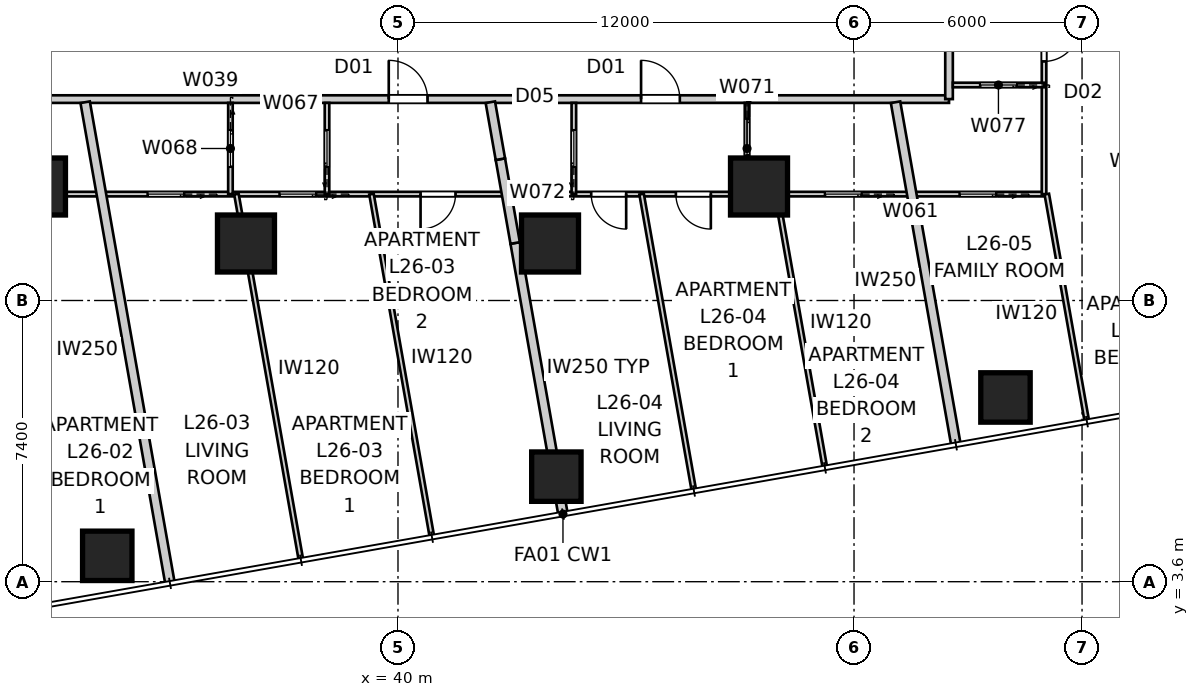
"""IFC4 building model, lengths in metres.
Left out: names, types, materials, properties, quantities, classifications, styles, units other than length and angle.
Written with IfcOpenShell. Run it as: python <this file> out.ifc"""

import sys

from ifc_helpers import new_model, si_unit, direction, frame, frame_2d, origin, origin_2d, place, context, subcontext, project, spatial, rectangle, extrude, element, fill, save


model = new_model("IFC4")
c1 = context("Model", 3, precision=1e-05, world=origin(), true_north=direction((0.0, 1.0)))
c2 = subcontext(c1, "Body", "Model", "MODEL_VIEW")
j1 = project(units=[si_unit("LENGTHUNIT", "METRE"), si_unit("PLANEANGLEUNIT", "RADIAN")], contexts=[c1])
p1 = place(None, origin())
s1 = spatial("IfcSite", under=j1, at=p1, CompositionType="ELEMENT")
p2 = place(p1, origin())
s2 = spatial("IfcBuilding", under=s1, at=p2, CompositionType="ELEMENT")
p3 = place(p2, frame((0.0, 0.0, 96.4)))
s3 = spatial("IfcBuildingStorey", under=s2, at=p3, CompositionType="ELEMENT", Elevation=96.4)
for number, where, z_axis, x_axis in (
    (1, (32.35, 4.281, 0.0), (0.0, 0.0, 1.0), (1.0, 0.0, 0.0)),
    (2, (44.167, 6.365, 0.0), (0.0, 0.0, 1.0), (1.0, 0.0, 0.0)),
    (3, (55.985, 8.448, 0.0), (0.0, 0.0, 1.0), (1.0, 0.0, 0.0)),
):
    element("IfcColumn", number, at=place(p3, frame(where, z_axis=z_axis, x_axis=x_axis)), inside=s3, PredefinedType="COLUMN", context=c2, shape_type="SweptSolid", body=[
        extrude(rectangle(XDim=1.3, YDim=1.3, at=origin_2d()), origin(), (0.0, 0.0, 1.0), 3.4),
    ])
for number, where, z_axis, x_axis in (
    (4, (30.5, 14.0, 0.0), (0.0, 0.0, 1.0), (1.0, 0.0, 0.0)),
    (5, (36.0, 12.5, 0.0), (0.0, 0.0, 1.0), (1.0, 0.0, 0.0)),
    (6, (44.0, 12.5, 0.0), (0.0, 0.0, 1.0), (1.0, 0.0, 0.0)),
    (7, (49.5, 14.0, 0.0), (0.0, 0.0, 1.0), (1.0, 0.0, 0.0)),
):
    element("IfcColumn", number, at=place(p3, frame(where, z_axis=z_axis, x_axis=x_axis)), inside=s3, PredefinedType="COLUMN", context=c2, shape_type="SweptSolid", body=[
        extrude(rectangle(XDim=1.5, YDim=1.5, at=origin_2d()), origin(), (0.0, 0.0, 1.0), 3.4),
    ])
p4 = place(p3, frame((25.5, 16.3, 0.0), z_axis=(0.0, 0.0, 1.0), x_axis=(1.0, 0.0, 0.0)))
e8 = element("IfcWall", 8, at=p4, inside=s3, PredefinedType="PARTITIONING", context=c2, shape_type="SweptSolid", body=[
    extrude(rectangle(XDim=29.0, YDim=0.2, at=frame_2d((14.5, 0.0))), origin(), (0.0, 0.0, 1.0), 3.25),
])
p5 = place(p4, frame((20.896, 0.0, 0.0)))
e9 = element("IfcOpeningElement", 9, at=p5, cuts=e8, PredefinedType="OPENING", context=c2, shape_type="SweptSolid", body=[
    extrude(rectangle(XDim=1.02, YDim=2.34, at=frame_2d((0.51, 1.17))), frame((0.0, 0.11, 0.0), z_axis=(0.0, -1.0, 0.0), x_axis=(1.0, 0.0, 0.0)), (0.0, 0.0, 1.0), 0.22),
])
p6 = place(p4, frame((14.257, 0.0, 0.0)))
e10 = element("IfcOpeningElement", 10, at=p6, cuts=e8, PredefinedType="OPENING", context=c2, shape_type="SweptSolid", body=[
    extrude(rectangle(XDim=1.02, YDim=2.34, at=frame_2d((0.51, 1.17))), frame((0.0, 0.11, 0.0), z_axis=(0.0, -1.0, 0.0), x_axis=(1.0, 0.0, 0.0)), (0.0, 0.0, 1.0), 0.22),
])
p7 = place(p4, frame((3.857, 0.0, 0.0)))
e11 = element("IfcOpeningElement", 11, at=p7, cuts=e8, PredefinedType="OPENING", context=c2, shape_type="SweptSolid", body=[
    extrude(rectangle(XDim=1.02, YDim=2.34, at=frame_2d((0.51, 1.17))), frame((0.0, 0.11, 0.0), z_axis=(0.0, -1.0, 0.0), x_axis=(1.0, 0.0, 0.0)), (0.0, 0.0, 1.0), 0.22),
])
p8 = place(p3, frame((54.5, 16.3, 0.0), z_axis=(0.0, 0.0, 1.0), x_axis=(0.0, 1.0, 0.0)))
e12 = element("IfcWall", 12, at=p8, inside=s3, PredefinedType="PARTITIONING", context=c2, shape_type="SweptSolid", body=[
    extrude(rectangle(XDim=27.4, YDim=0.2, at=frame_2d((13.7, 0.0))), origin(), (0.0, 0.0, 1.0), 3.25),
])
p9 = place(p8, frame((19.308, 0.0, 0.0)))
e13 = element("IfcOpeningElement", 13, at=p9, cuts=e12, PredefinedType="OPENING", context=c2, shape_type="SweptSolid", body=[
    extrude(rectangle(XDim=1.02, YDim=2.34, at=frame_2d((0.51, 1.17))), frame((0.0, 0.11, 0.0), z_axis=(0.0, -1.0, 0.0), x_axis=(1.0, 0.0, 0.0)), (0.0, 0.0, 1.0), 0.22),
])
p10 = place(p8, frame((24.687, 0.0, 0.0)))
e14 = element("IfcOpeningElement", 14, at=p10, cuts=e12, PredefinedType="OPENING", context=c2, shape_type="SweptSolid", body=[
    extrude(rectangle(XDim=1.02, YDim=2.1, at=frame_2d((0.51, 1.05))), frame((0.0, 0.11, 0.0), z_axis=(0.0, -1.0, 0.0), x_axis=(1.0, 0.0, 0.0)), (0.0, 0.0, 1.0), 0.22),
])
p11 = place(p8, frame((1.622, 0.0, 0.0)))
e15 = element("IfcOpeningElement", 15, at=p11, cuts=e12, PredefinedType="OPENING", context=c2, shape_type="SweptSolid", body=[
    extrude(rectangle(XDim=1.02, YDim=2.1, at=frame_2d((0.51, 1.05))), frame((0.0, 0.11, 0.0), z_axis=(0.0, -1.0, 0.0), x_axis=(1.0, 0.0, 0.0)), (0.0, 0.0, 1.0), 0.22),
])
p12 = place(p3, frame((44.341, 5.38, 0.0), z_axis=(0.0, 0.0, 1.0), x_axis=(-0.173677660443, 0.984802553948, 0.0)))
e16 = element("IfcWall", 16, at=p12, inside=s3, PredefinedType="PARTITIONING", context=c2, shape_type="SweptSolid", body=[
    extrude(rectangle(XDim=7.244, YDim=0.25, at=frame_2d((3.622, 0.0))), origin(), (0.0, 0.0, 1.0), 3.25),
])
p13 = place(p3, frame((43.083, 12.513, 0.0), z_axis=(0.0, 0.0, 1.0), x_axis=(-0.17363609779, 0.984809882944, 0.0)))
e17 = element("IfcWall", 17, at=p13, inside=s3, PredefinedType="PARTITIONING", context=c2, shape_type="SweptSolid", body=[
    extrude(rectangle(XDim=2.24, YDim=0.25, at=frame_2d((1.12, 0.0))), origin(), (0.0, 0.0, 1.0), 2.796),
])
p14 = place(p3, frame((42.694, 14.719, 0.0), z_axis=(0.0, 0.0, 1.0), x_axis=(-0.173602272028, 0.984815846312, 0.0)))
e18 = element("IfcWall", 18, at=p14, inside=s3, PredefinedType="PARTITIONING", context=c2, shape_type="SweptSolid", body=[
    extrude(rectangle(XDim=1.522, YDim=0.25, at=frame_2d((0.761, 0.0))), origin(), (0.0, 0.0, 1.0), 3.25),
])
p15 = place(p3, frame((34.001, 3.556, 0.0), z_axis=(0.0, 0.0, 1.0), x_axis=(-0.173639088111, 0.984809355703, 0.0)))
e19 = element("IfcWall", 19, at=p15, inside=s3, PredefinedType="PARTITIONING", context=c2, shape_type="SweptSolid", body=[
    extrude(rectangle(XDim=12.857, YDim=0.25, at=frame_2d((6.428, 0.0))), origin(), (0.0, 0.0, 1.0), 3.25),
])
p16 = place(p3, frame((54.682, 7.203, 0.0), z_axis=(0.0, 0.0, 1.0), x_axis=(-0.173630137029, 0.984810933893, 0.0)))
e20 = element("IfcWall", 20, at=p16, inside=s3, PredefinedType="PARTITIONING", context=c2, shape_type="SweptSolid", body=[
    extrude(rectangle(XDim=9.154, YDim=0.25, at=frame_2d((4.577, 0.0))), origin(), (0.0, 0.0, 1.0), 3.25),
])
p17 = place(p3, frame((57.0, 13.8, 0.0), z_axis=(0.0, 0.0, 1.0), x_axis=(-1.0, 0.0, 0.0)))
e21 = element("IfcWall", 21, at=p17, inside=s3, PredefinedType="PARTITIONING", context=c2, shape_type="SweptSolid", body=[
    extrude(rectangle(XDim=34.0, YDim=0.12, at=frame_2d((17.0, 0.0))), origin(), (0.0, 0.0, 1.0), 2.55),
])
p18 = place(p17, frame((8.768, 0.0, 0.0)))
e22 = element("IfcOpeningElement", 22, at=p18, cuts=e21, PredefinedType="OPENING", context=c2, shape_type="SweptSolid", body=[
    extrude(rectangle(XDim=0.92, YDim=2.34, at=frame_2d((0.46, 1.17))), frame((0.0, 0.07, 0.0), z_axis=(0.0, -1.0, 0.0), x_axis=(1.0, 0.0, 0.0)), (0.0, 0.0, 1.0), 0.14),
])
p19 = place(p17, frame((10.995, 0.0, 0.0)))
e23 = element("IfcOpeningElement", 23, at=p19, cuts=e21, PredefinedType="OPENING", context=c2, shape_type="SweptSolid", body=[
    extrude(rectangle(XDim=0.92, YDim=2.34, at=frame_2d((0.46, 1.17))), frame((0.0, 0.07, 0.0), z_axis=(0.0, -1.0, 0.0), x_axis=(1.0, 0.0, 0.0)), (0.0, 0.0, 1.0), 0.14),
])
p20 = place(p17, frame((15.486, 0.0, 0.0)))
e24 = element("IfcOpeningElement", 24, at=p20, cuts=e21, PredefinedType="OPENING", context=c2, shape_type="SweptSolid", body=[
    extrude(rectangle(XDim=0.92, YDim=2.34, at=frame_2d((0.46, 1.17))), frame((0.0, 0.07, 0.0), z_axis=(0.0, -1.0, 0.0), x_axis=(1.0, 0.0, 0.0)), (0.0, 0.0, 1.0), 0.14),
])
p21 = place(p17, frame((4.804, 0.0, 0.0)))
e25 = element("IfcOpeningElement", 25, at=p21, cuts=e21, PredefinedType="OPENING", context=c2, shape_type="SweptSolid", body=[
    extrude(rectangle(XDim=0.96, YDim=2.1, at=frame_2d((0.48, 1.05))), frame((0.0, 0.07, 0.0), z_axis=(0.0, -1.0, 0.0), x_axis=(1.0, 0.0, 0.0)), (0.0, 0.0, 1.0), 0.14),
])
p22 = place(p17, frame((19.155, 0.0, 0.0)))
e26 = element("IfcOpeningElement", 26, at=p22, cuts=e21, PredefinedType="OPENING", context=c2, shape_type="SweptSolid", body=[
    extrude(rectangle(XDim=0.96, YDim=2.1, at=frame_2d((0.48, 1.05))), frame((0.0, 0.07, 0.0), z_axis=(0.0, -1.0, 0.0), x_axis=(1.0, 0.0, 0.0)), (0.0, 0.0, 1.0), 0.14),
])
p23 = place(p17, frame((31.473, 0.0, 0.0)))
e27 = element("IfcOpeningElement", 27, at=p23, cuts=e21, PredefinedType="OPENING", context=c2, shape_type="SweptSolid", body=[
    extrude(rectangle(XDim=0.96, YDim=2.1, at=frame_2d((0.48, 1.05))), frame((0.0, 0.07, 0.0), z_axis=(0.0, -1.0, 0.0), x_axis=(1.0, 0.0, 0.0)), (0.0, 0.0, 1.0), 0.14),
])
p24 = place(p17, frame((1.261, 0.0, 0.0)))
e28 = element("IfcOpeningElement", 28, at=p24, cuts=e21, PredefinedType="OPENING", context=c2, shape_type="SweptSolid", body=[
    extrude(rectangle(XDim=0.96, YDim=2.1, at=frame_2d((0.48, 1.05))), frame((0.0, 0.07, 0.0), z_axis=(0.0, -1.0, 0.0), x_axis=(1.0, 0.0, 0.0)), (0.0, 0.0, 1.0), 0.14),
])
p25 = place(p17, frame((22.627, 0.0, 0.0)))
e29 = element("IfcOpeningElement", 29, at=p25, cuts=e21, PredefinedType="OPENING", context=c2, shape_type="SweptSolid", body=[
    extrude(rectangle(XDim=0.96, YDim=2.1, at=frame_2d((0.48, 1.05))), frame((0.0, 0.07, 0.0), z_axis=(0.0, -1.0, 0.0), x_axis=(1.0, 0.0, 0.0)), (0.0, 0.0, 1.0), 0.14),
])
p26 = place(p3, frame((38.132, 13.8, 0.0), z_axis=(0.0, 0.0, 1.0), x_axis=(0.0, 1.0, 0.0)))
e30 = element("IfcWall", 30, at=p26, inside=s3, PredefinedType="PARTITIONING", context=c2, shape_type="SweptSolid", body=[
    extrude(rectangle(XDim=2.4, YDim=0.12, at=frame_2d((1.2, 0.0))), origin(), (0.0, 0.0, 1.0), 3.25),
])
p27 = place(p26, frame((0.72, 0.0, 0.0)))
e31 = element("IfcOpeningElement", 31, at=p27, cuts=e30, PredefinedType="OPENING", context=c2, shape_type="SweptSolid", body=[
    extrude(rectangle(XDim=0.96, YDim=2.1, at=frame_2d((0.48, 1.05))), frame((0.0, 0.07, 0.0), z_axis=(0.0, -1.0, 0.0), x_axis=(1.0, 0.0, 0.0)), (0.0, 0.0, 1.0), 0.14),
])
p28 = place(p3, frame((35.591, 16.2, 0.0), z_axis=(0.0, 0.0, 1.0), x_axis=(0.0, -1.0, 0.0)))
e32 = element("IfcWall", 32, at=p28, inside=s3, PredefinedType="PARTITIONING", context=c2, shape_type="SweptSolid", body=[
    extrude(rectangle(XDim=2.4, YDim=0.12, at=frame_2d((1.2, 0.0))), origin(), (0.0, 0.0, 1.0), 3.25),
])
p29 = place(p28, frame((0.72, 0.0, 0.0)))
e33 = element("IfcOpeningElement", 33, at=p29, cuts=e32, PredefinedType="OPENING", context=c2, shape_type="SweptSolid", body=[
    extrude(rectangle(XDim=0.96, YDim=2.1, at=frame_2d((0.48, 1.05))), frame((0.0, 0.07, 0.0), z_axis=(0.0, -1.0, 0.0), x_axis=(1.0, 0.0, 0.0)), (0.0, 0.0, 1.0), 0.14),
])
p30 = place(p3, frame((35.749, 13.8, 0.0), z_axis=(0.0, 0.0, 1.0), x_axis=(0.173650980998, -0.984807258705, 0.0)))
e34 = element("IfcWall", 34, at=p30, inside=s3, PredefinedType="PARTITIONING", context=c2, shape_type="SweptSolid", body=[
    extrude(rectangle(XDim=9.744, YDim=0.12, at=frame_2d((4.872, 0.0))), origin(), (0.0, 0.0, 1.0), 3.25),
])
p31 = place(p3, frame((39.302, 13.8, 0.0), z_axis=(0.0, 0.0, 1.0), x_axis=(0.173652576186, -0.984806977424, 0.0)))
e35 = element("IfcWall", 35, at=p31, inside=s3, PredefinedType="PARTITIONING", context=c2, shape_type="SweptSolid", body=[
    extrude(rectangle(XDim=9.127, YDim=0.12, at=frame_2d((4.563, 0.0))), origin(), (0.0, 0.0, 1.0), 3.25),
])
p32 = place(p3, frame((49.185, 16.2, 0.0), z_axis=(0.0, 0.0, 1.0), x_axis=(0.0, -1.0, 0.0)))
e36 = element("IfcWall", 36, at=p32, inside=s3, PredefinedType="PARTITIONING", context=c2, shape_type="SweptSolid", body=[
    extrude(rectangle(XDim=2.4, YDim=0.12, at=frame_2d((1.2, 0.0))), origin(), (0.0, 0.0, 1.0), 3.25),
])
p33 = place(p32, frame((0.42, 0.0, 0.0)))
e37 = element("IfcOpeningElement", 37, at=p33, cuts=e36, PredefinedType="OPENING", context=c2, shape_type="SweptSolid", body=[
    extrude(rectangle(XDim=0.96, YDim=2.1, at=frame_2d((0.48, 1.05))), frame((0.0, 0.07, 0.0), z_axis=(0.0, -1.0, 0.0), x_axis=(1.0, 0.0, 0.0)), (0.0, 0.0, 1.0), 0.14),
])
p34 = place(p3, frame((44.628, 13.8, 0.0), z_axis=(0.0, 0.0, 1.0), x_axis=(0.0, 1.0, 0.0)))
e38 = element("IfcWall", 38, at=p34, inside=s3, PredefinedType="PARTITIONING", context=c2, shape_type="SweptSolid", body=[
    extrude(rectangle(XDim=2.4, YDim=0.12, at=frame_2d((1.2, 0.0))), origin(), (0.0, 0.0, 1.0), 3.25),
])
p35 = place(p34, frame((0.72, 0.0, 0.0)))
e39 = element("IfcOpeningElement", 39, at=p35, cuts=e38, PredefinedType="OPENING", context=c2, shape_type="SweptSolid", body=[
    extrude(rectangle(XDim=0.96, YDim=2.1, at=frame_2d((0.48, 1.05))), frame((0.0, 0.07, 0.0), z_axis=(0.0, -1.0, 0.0), x_axis=(1.0, 0.0, 0.0)), (0.0, 0.0, 1.0), 0.14),
])
p36 = place(p3, frame((46.41, 13.8, 0.0), z_axis=(0.0, 0.0, 1.0), x_axis=(0.173645935638, -0.98480814834, 0.0)))
e40 = element("IfcWall", 40, at=p36, inside=s3, PredefinedType="PARTITIONING", context=c2, shape_type="SweptSolid", body=[
    extrude(rectangle(XDim=7.893, YDim=0.12, at=frame_2d((3.947, 0.0))), origin(), (0.0, 0.0, 1.0), 3.25),
])
p37 = place(p3, frame((49.964, 13.8, 0.0), z_axis=(0.0, 0.0, 1.0), x_axis=(0.173647508681, -0.984807870972, 0.0)))
e41 = element("IfcWall", 41, at=p37, inside=s3, PredefinedType="PARTITIONING", context=c2, shape_type="SweptSolid", body=[
    extrude(rectangle(XDim=7.276, YDim=0.12, at=frame_2d((3.638, 0.0))), origin(), (0.0, 0.0, 1.0), 3.25),
])
p38 = place(p3, frame((57.0, 46.2, 0.0), z_axis=(0.0, 0.0, 1.0), x_axis=(0.0, -1.0, 0.0)))
e42 = element("IfcWall", 42, at=p38, inside=s3, PredefinedType="PARTITIONING", context=c2, shape_type="SweptSolid", body=[
    extrude(rectangle(XDim=32.4, YDim=0.12, at=frame_2d((16.2, 0.0))), origin(), (0.0, 0.0, 1.0), 2.55),
])
p39 = place(p38, frame((10.396, 0.0, 0.0)))
e43 = element("IfcOpeningElement", 43, at=p39, cuts=e42, PredefinedType="OPENING", context=c2, shape_type="SweptSolid", body=[
    extrude(rectangle(XDim=0.92, YDim=2.34, at=frame_2d((0.46, 1.17))), frame((0.0, 0.07, 0.0), z_axis=(0.0, -1.0, 0.0), x_axis=(1.0, 0.0, 0.0)), (0.0, 0.0, 1.0), 0.14),
])
p40 = place(p38, frame((7.587, 0.0, 0.0)))
e44 = element("IfcOpeningElement", 44, at=p40, cuts=e42, PredefinedType="OPENING", context=c2, shape_type="SweptSolid", body=[
    extrude(rectangle(XDim=0.92, YDim=2.34, at=frame_2d((0.46, 1.17))), frame((0.0, 0.07, 0.0), z_axis=(0.0, -1.0, 0.0), x_axis=(1.0, 0.0, 0.0)), (0.0, 0.0, 1.0), 0.14),
])
p41 = place(p38, frame((3.843, 0.0, 0.0)))
e45 = element("IfcOpeningElement", 45, at=p41, cuts=e42, PredefinedType="OPENING", context=c2, shape_type="SweptSolid", body=[
    extrude(rectangle(XDim=0.92, YDim=2.34, at=frame_2d((0.46, 1.17))), frame((0.0, 0.07, 0.0), z_axis=(0.0, -1.0, 0.0), x_axis=(1.0, 0.0, 0.0)), (0.0, 0.0, 1.0), 0.14),
])
p42 = place(p38, frame((27.988, 0.0, 0.0)))
e46 = element("IfcOpeningElement", 46, at=p42, cuts=e42, PredefinedType="OPENING", context=c2, shape_type="SweptSolid", body=[
    extrude(rectangle(XDim=0.92, YDim=2.34, at=frame_2d((0.46, 1.17))), frame((0.0, 0.07, 0.0), z_axis=(0.0, -1.0, 0.0), x_axis=(1.0, 0.0, 0.0)), (0.0, 0.0, 1.0), 0.14),
])
p43 = place(p38, frame((23.957, 0.0, 0.0)))
e47 = element("IfcOpeningElement", 47, at=p43, cuts=e42, PredefinedType="OPENING", context=c2, shape_type="SweptSolid", body=[
    extrude(rectangle(XDim=0.96, YDim=2.1, at=frame_2d((0.48, 1.05))), frame((0.0, 0.07, 0.0), z_axis=(0.0, -1.0, 0.0), x_axis=(1.0, 0.0, 0.0)), (0.0, 0.0, 1.0), 0.14),
])
p44 = place(p38, frame((21.108, 0.0, 0.0)))
e48 = element("IfcOpeningElement", 48, at=p44, cuts=e42, PredefinedType="OPENING", context=c2, shape_type="SweptSolid", body=[
    extrude(rectangle(XDim=0.96, YDim=2.1, at=frame_2d((0.48, 1.05))), frame((0.0, 0.07, 0.0), z_axis=(0.0, -1.0, 0.0), x_axis=(1.0, 0.0, 0.0)), (0.0, 0.0, 1.0), 0.14),
])
p45 = place(p3, frame((57.0, 16.671, 0.0), z_axis=(0.0, 0.0, 1.0), x_axis=(-1.0, 0.0, 0.0)))
e49 = element("IfcWall", 49, at=p45, inside=s3, PredefinedType="PARTITIONING", context=c2, shape_type="SweptSolid", body=[
    extrude(rectangle(XDim=2.4, YDim=0.12, at=frame_2d((1.2, 0.0))), origin(), (0.0, 0.0, 1.0), 3.25),
])
p46 = place(p45, frame((0.72, 0.0, 0.0)))
e50 = element("IfcOpeningElement", 50, at=p46, cuts=e49, PredefinedType="OPENING", context=c2, shape_type="SweptSolid", body=[
    extrude(rectangle(XDim=0.96, YDim=2.1, at=frame_2d((0.48, 1.05))), frame((0.0, 0.07, 0.0), z_axis=(0.0, -1.0, 0.0), x_axis=(1.0, 0.0, 0.0)), (0.0, 0.0, 1.0), 0.14),
])
p47 = place(p3, frame((58.122, 7.85, 0.0), z_axis=(0.0, 0.0, 1.0), x_axis=(-0.173644708382, 0.984808364734, 0.0)))
e51 = element("IfcWall", 51, at=p47, inside=s3, PredefinedType="PARTITIONING", context=c2, shape_type="SweptSolid", body=[
    extrude(rectangle(XDim=6.042, YDim=0.12, at=frame_2d((3.021, 0.0))), origin(), (0.0, 0.0, 1.0), 2.638),
])
p48 = place(p5, origin())
e52 = element("IfcDoor", 52, at=p48, inside=s3, OperationType="SINGLE_SWING_LEFT", PredefinedType="DOOR", context=c2, shape_type="SweptSolid", body=[
    extrude(rectangle(XDim=1.02, YDim=2.34, at=frame_2d((0.51, 1.17))), frame((0.0, 0.025, 0.0), z_axis=(0.0, -1.0, 0.0), x_axis=(1.0, 0.0, 0.0)), (0.0, 0.0, 1.0), 0.05),
])
fill(e9, e52)
p49 = place(p6, origin())
e53 = element("IfcDoor", 53, at=p49, inside=s3, OperationType="SINGLE_SWING_LEFT", PredefinedType="DOOR", context=c2, shape_type="SweptSolid", body=[
    extrude(rectangle(XDim=1.02, YDim=2.34, at=frame_2d((0.51, 1.17))), frame((0.0, 0.025, 0.0), z_axis=(0.0, -1.0, 0.0), x_axis=(1.0, 0.0, 0.0)), (0.0, 0.0, 1.0), 0.05),
])
fill(e10, e53)
p50 = place(p18, origin())
e54 = element("IfcDoor", 54, at=p50, inside=s3, OperationType="SINGLE_SWING_LEFT", PredefinedType="DOOR", context=c2, shape_type="SweptSolid", body=[
    extrude(rectangle(XDim=0.92, YDim=2.34, at=frame_2d((0.46, 1.17))), frame((0.0, 0.025, 0.0), z_axis=(0.0, -1.0, 0.0), x_axis=(1.0, 0.0, 0.0)), (0.0, 0.0, 1.0), 0.05),
])
fill(e22, e54)
p51 = place(p33, origin())
e55 = element("IfcDoor", 55, at=p51, inside=s3, OperationType="SLIDING_TO_LEFT", PredefinedType="DOOR", context=c2, shape_type="SweptSolid", body=[
    extrude(rectangle(XDim=0.96, YDim=2.1, at=frame_2d((0.48, 1.05))), frame((0.0, 0.025, 0.0), z_axis=(0.0, -1.0, 0.0), x_axis=(1.0, 0.0, 0.0)), (0.0, 0.0, 1.0), 0.05),
])
fill(e37, e55)
p52 = place(p35, origin())
e56 = element("IfcDoor", 56, at=p52, inside=s3, OperationType="SLIDING_TO_LEFT", PredefinedType="DOOR", context=c2, shape_type="SweptSolid", body=[
    extrude(rectangle(XDim=0.96, YDim=2.1, at=frame_2d((0.48, 1.05))), frame((0.0, 0.025, 0.0), z_axis=(0.0, -1.0, 0.0), x_axis=(1.0, 0.0, 0.0)), (0.0, 0.0, 1.0), 0.05),
])
fill(e39, e56)
p53 = place(p19, origin())
e57 = element("IfcDoor", 57, at=p53, inside=s3, OperationType="SINGLE_SWING_LEFT", PredefinedType="DOOR", context=c2, shape_type="SweptSolid", body=[
    extrude(rectangle(XDim=0.92, YDim=2.34, at=frame_2d((0.46, 1.17))), frame((0.0, 0.025, 0.0), z_axis=(0.0, -1.0, 0.0), x_axis=(1.0, 0.0, 0.0)), (0.0, 0.0, 1.0), 0.05),
])
fill(e23, e57)
p54 = place(p20, origin())
e58 = element("IfcDoor", 58, at=p54, inside=s3, OperationType="SINGLE_SWING_RIGHT", PredefinedType="DOOR", context=c2, shape_type="SweptSolid", body=[
    extrude(rectangle(XDim=0.92, YDim=2.34, at=frame_2d((0.46, 1.17))), frame((0.0, 0.025, 0.0), z_axis=(0.0, -1.0, 0.0), x_axis=(1.0, 0.0, 0.0)), (0.0, 0.0, 1.0), 0.05),
])
fill(e24, e58)
p55 = place(p27, origin())
e59 = element("IfcDoor", 59, at=p55, inside=s3, OperationType="SLIDING_TO_LEFT", PredefinedType="DOOR", context=c2, shape_type="SweptSolid", body=[
    extrude(rectangle(XDim=0.96, YDim=2.1, at=frame_2d((0.48, 1.05))), frame((0.0, 0.025, 0.0), z_axis=(0.0, -1.0, 0.0), x_axis=(1.0, 0.0, 0.0)), (0.0, 0.0, 1.0), 0.05),
])
fill(e31, e59)
p56 = place(p46, origin())
e60 = element("IfcDoor", 60, at=p56, inside=s3, OperationType="SLIDING_TO_LEFT", PredefinedType="DOOR", context=c2, shape_type="SweptSolid", body=[
    extrude(rectangle(XDim=0.96, YDim=2.1, at=frame_2d((0.48, 1.05))), frame((0.0, 0.025, 0.0), z_axis=(0.0, -1.0, 0.0), x_axis=(1.0, 0.0, 0.0)), (0.0, 0.0, 1.0), 0.05),
])
fill(e50, e60)
p57 = place(p42, origin())
e61 = element("IfcDoor", 61, at=p57, inside=s3, OperationType="SINGLE_SWING_LEFT", PredefinedType="DOOR", context=c2, shape_type="SweptSolid", body=[
    extrude(rectangle(XDim=0.92, YDim=2.34, at=frame_2d((0.46, 1.17))), frame((0.0, 0.025, 0.0), z_axis=(0.0, -1.0, 0.0), x_axis=(1.0, 0.0, 0.0)), (0.0, 0.0, 1.0), 0.05),
])
fill(e46, e61)
p58 = place(p21, origin())
e62 = element("IfcDoor", 62, at=p58, inside=s3, OperationType="SLIDING_TO_LEFT", PredefinedType="DOOR", context=c2, shape_type="SweptSolid", body=[
    extrude(rectangle(XDim=0.96, YDim=2.1, at=frame_2d((0.48, 1.05))), frame((0.0, 0.025, 0.0), z_axis=(0.0, -1.0, 0.0), x_axis=(1.0, 0.0, 0.0)), (0.0, 0.0, 1.0), 0.05),
])
fill(e25, e62)
p59 = place(p22, origin())
e63 = element("IfcDoor", 63, at=p59, inside=s3, OperationType="SLIDING_TO_LEFT", PredefinedType="DOOR", context=c2, shape_type="SweptSolid", body=[
    extrude(rectangle(XDim=0.96, YDim=2.1, at=frame_2d((0.48, 1.05))), frame((0.0, 0.025, 0.0), z_axis=(0.0, -1.0, 0.0), x_axis=(1.0, 0.0, 0.0)), (0.0, 0.0, 1.0), 0.05),
])
fill(e26, e63)
p60 = place(p29, origin())
e64 = element("IfcDoor", 64, at=p60, inside=s3, OperationType="SLIDING_TO_LEFT", PredefinedType="DOOR", context=c2, shape_type="SweptSolid", body=[
    extrude(rectangle(XDim=0.96, YDim=2.1, at=frame_2d((0.48, 1.05))), frame((0.0, 0.025, 0.0), z_axis=(0.0, -1.0, 0.0), x_axis=(1.0, 0.0, 0.0)), (0.0, 0.0, 1.0), 0.05),
])
fill(e33, e64)
p61 = place(p24, origin())
e65 = element("IfcDoor", 65, at=p61, inside=s3, OperationType="SLIDING_TO_LEFT", PredefinedType="DOOR", context=c2, shape_type="SweptSolid", body=[
    extrude(rectangle(XDim=0.96, YDim=2.1, at=frame_2d((0.48, 1.05))), frame((0.0, 0.025, 0.0), z_axis=(0.0, -1.0, 0.0), x_axis=(1.0, 0.0, 0.0)), (0.0, 0.0, 1.0), 0.05),
])
fill(e28, e65)
p62 = place(p25, origin())
e66 = element("IfcDoor", 66, at=p62, inside=s3, OperationType="SLIDING_TO_LEFT", PredefinedType="DOOR", context=c2, shape_type="SweptSolid", body=[
    extrude(rectangle(XDim=0.96, YDim=2.1, at=frame_2d((0.48, 1.05))), frame((0.0, 0.025, 0.0), z_axis=(0.0, -1.0, 0.0), x_axis=(1.0, 0.0, 0.0)), (0.0, 0.0, 1.0), 0.05),
])
fill(e29, e66)
save(model, sys.argv[1])
